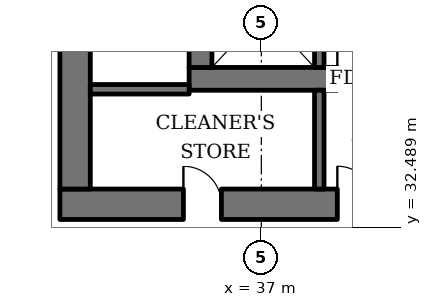
"""IFC4 building model, lengths in metres.
Left out: names, types, materials, properties, quantities, classifications, styles, units other than length and angle.
Written with IfcOpenShell. Run it as: python <this file> out.ifc"""

import sys

from ifc_helpers import new_model, si_unit, direction, frame, frame_2d, origin, place, context, subcontext, project, spatial, rectangle, extrude, element, fill, save


model = new_model("IFC4")
c1 = context("Model", 3, precision=1e-05, world=origin(), true_north=direction((0.0, 1.0)))
c2 = subcontext(c1, "Body", "Model", "MODEL_VIEW")
j1 = project(units=[si_unit("LENGTHUNIT", "METRE"), si_unit("PLANEANGLEUNIT", "RADIAN")], contexts=[c1])
p1 = place(None, origin())
s1 = spatial("IfcSite", under=j1, at=p1, CompositionType="ELEMENT")
p2 = place(p1, origin())
s2 = spatial("IfcBuilding", under=s1, at=p2, CompositionType="ELEMENT")
p3 = place(p2, frame((0.0, 0.0, -5.0)))
s3 = spatial("IfcBuildingStorey", under=s2, at=p3, CompositionType="ELEMENT", Elevation=-5.0)
p4 = place(p3, frame((35.1, 36.4, 0.0), z_axis=(0.0, 0.0, 1.0), x_axis=(1.0, 0.0, 0.0)))
e1 = element("IfcWall", 1, at=p4, inside=s3, PredefinedType="SHEAR", context=c2, shape_type="SweptSolid", body=[
    extrude(rectangle(XDim=19.8, YDim=0.6, at=frame_2d((9.9, 0.0))), origin(), (0.0, 0.0, 1.0), 5.0),
])
p5 = place(p4, frame((3.9, 0.0, 0.0)))
e2 = element("IfcOpeningElement", 2, at=p5, cuts=e1, PredefinedType="OPENING", context=c2, shape_type="SweptSolid", body=[
    extrude(rectangle(XDim=1.0, YDim=2.1, at=frame_2d((0.5, 1.05))), frame((0.0, 0.31, 0.0), z_axis=(0.0, -1.0, 0.0), x_axis=(1.0, 0.0, 0.0)), (0.0, 0.0, 1.0), 0.62),
])
p6 = place(p4, frame((15.35, 0.0, 0.0)))
e3 = element("IfcOpeningElement", 3, at=p6, cuts=e1, PredefinedType="OPENING", context=c2, shape_type="SweptSolid", body=[
    extrude(rectangle(XDim=1.0, YDim=2.1, at=frame_2d((0.5, 1.05))), frame((0.0, 0.31, 0.0), z_axis=(0.0, -1.0, 0.0), x_axis=(1.0, 0.0, 0.0)), (0.0, 0.0, 1.0), 0.62),
])
p7 = place(p3, frame((35.4, 36.7, 0.0), z_axis=(0.0, 0.0, 1.0), x_axis=(0.0, 1.0, 0.0)))
e4 = element("IfcWall", 4, at=p7, inside=s3, PredefinedType="SHEAR", context=c2, shape_type="SweptSolid", body=[
    extrude(rectangle(XDim=18.6, YDim=0.6, at=frame_2d((9.3, 0.0))), origin(), (0.0, 0.0, 1.0), 5.0),
])
p8 = place(p7, frame((8.4, 0.0, 0.0)))
e5 = element("IfcOpeningElement", 5, at=p8, cuts=e4, PredefinedType="OPENING", context=c2, shape_type="SweptSolid", body=[
    extrude(rectangle(XDim=1.8, YDim=2.4, at=frame_2d((0.9, 1.2))), frame((0.0, 0.31, 0.0), z_axis=(0.0, -1.0, 0.0), x_axis=(1.0, 0.0, 0.0)), (0.0, 0.0, 1.0), 0.62),
])
p9 = place(p3, frame((31.7, 33.1, 0.0), z_axis=(0.0, 0.0, 1.0), x_axis=(1.0, 0.0, 0.0)))
e6 = element("IfcWall", 6, at=p9, inside=s3, PredefinedType="SHEAR", context=c2, shape_type="SweptSolid", body=[
    extrude(rectangle(XDim=26.6, YDim=0.8, at=frame_2d((13.3, 0.0))), origin(), (0.0, 0.0, 1.0), 5.0),
])
p10 = place(p9, frame((7.3, 0.0, 0.0)))
e7 = element("IfcOpeningElement", 7, at=p10, cuts=e6, PredefinedType="OPENING", context=c2, shape_type="SweptSolid", body=[
    extrude(rectangle(XDim=1.0, YDim=2.1, at=frame_2d((0.5, 1.05))), frame((0.0, 0.41, 0.0), z_axis=(0.0, -1.0, 0.0), x_axis=(1.0, 0.0, 0.0)), (0.0, 0.0, 1.0), 0.82),
])
p11 = place(p9, frame((18.75, 0.0, 0.0)))
e8 = element("IfcOpeningElement", 8, at=p11, cuts=e6, PredefinedType="OPENING", context=c2, shape_type="SweptSolid", body=[
    extrude(rectangle(XDim=1.0, YDim=2.1, at=frame_2d((0.5, 1.05))), frame((0.0, 0.41, 0.0), z_axis=(0.0, -1.0, 0.0), x_axis=(1.0, 0.0, 0.0)), (0.0, 0.0, 1.0), 0.82),
])
p12 = place(p9, frame((3.25, 0.0, 0.0)))
e9 = element("IfcOpeningElement", 9, at=p12, cuts=e6, PredefinedType="OPENING", context=c2, shape_type="SweptSolid", body=[
    extrude(rectangle(XDim=1.0, YDim=2.1, at=frame_2d((0.5, 1.05))), frame((0.0, 0.41, 0.0), z_axis=(0.0, -1.0, 0.0), x_axis=(1.0, 0.0, 0.0)), (0.0, 0.0, 1.0), 0.82),
])
p13 = place(p9, frame((10.42, 0.0, 0.0)))
e10 = element("IfcOpeningElement", 10, at=p13, cuts=e6, PredefinedType="OPENING", context=c2, shape_type="SweptSolid", body=[
    extrude(rectangle(XDim=1.0, YDim=2.1, at=frame_2d((0.5, 1.05))), frame((0.0, 0.41, 0.0), z_axis=(0.0, -1.0, 0.0), x_axis=(1.0, 0.0, 0.0)), (0.0, 0.0, 1.0), 0.82),
])
p14 = place(p9, frame((14.46, 0.0, 0.0)))
e11 = element("IfcOpeningElement", 11, at=p14, cuts=e6, PredefinedType="OPENING", context=c2, shape_type="SweptSolid", body=[
    extrude(rectangle(XDim=1.0, YDim=2.1, at=frame_2d((0.5, 1.05))), frame((0.0, 0.41, 0.0), z_axis=(0.0, -1.0, 0.0), x_axis=(1.0, 0.0, 0.0)), (0.0, 0.0, 1.0), 0.82),
])
p15 = place(p9, frame((22.45, 0.0, 0.0)))
e12 = element("IfcOpeningElement", 12, at=p15, cuts=e6, PredefinedType="OPENING", context=c2, shape_type="SweptSolid", body=[
    extrude(rectangle(XDim=1.0, YDim=2.1, at=frame_2d((0.5, 1.05))), frame((0.0, 0.41, 0.0), z_axis=(0.0, -1.0, 0.0), x_axis=(1.0, 0.0, 0.0)), (0.0, 0.0, 1.0), 0.82),
])
p16 = place(p3, frame((32.1, 33.5, 0.0), z_axis=(0.0, 0.0, 1.0), x_axis=(0.0, 1.0, 0.0)))
e13 = element("IfcWall", 13, at=p16, inside=s3, PredefinedType="SHEAR", context=c2, shape_type="SweptSolid", body=[
    extrude(rectangle(XDim=25.0, YDim=0.8, at=frame_2d((12.5, 0.0))), origin(), (0.0, 0.0, 1.0), 5.0),
])
p17 = place(p16, frame((11.6, 0.0, 0.0)))
e14 = element("IfcOpeningElement", 14, at=p17, cuts=e13, PredefinedType="OPENING", context=c2, shape_type="SweptSolid", body=[
    extrude(rectangle(XDim=1.8, YDim=2.4, at=frame_2d((0.9, 1.2))), frame((0.0, 0.41, 0.0), z_axis=(0.0, -1.0, 0.0), x_axis=(1.0, 0.0, 0.0)), (0.0, 0.0, 1.0), 0.82),
])
p18 = place(p3, frame((38.525, 36.7, 0.0), z_axis=(0.0, 0.0, 1.0), x_axis=(0.0, 1.0, 0.0)))
e15 = element("IfcWall", 15, at=p18, inside=s3, PredefinedType="SHEAR", context=c2, shape_type="SweptSolid", body=[
    extrude(rectangle(XDim=2.9, YDim=0.25, at=frame_2d((1.45, 0.0))), origin(), (0.0, 0.0, 1.0), 5.0),
])
p19 = place(p18, frame((0.8, 0.0, 0.0)))
e16 = element("IfcOpeningElement", 16, at=p19, cuts=e15, PredefinedType="OPENING", context=c2, shape_type="SweptSolid", body=[
    extrude(rectangle(XDim=1.3, YDim=2.2, at=frame_2d((0.65, 1.1))), frame((0.0, 0.135, 0.0), z_axis=(0.0, -1.0, 0.0), x_axis=(1.0, 0.0, 0.0)), (0.0, 0.0, 1.0), 0.27),
])
p20 = place(p3, frame((32.5, 36.125, 0.0), z_axis=(0.0, 0.0, 1.0), x_axis=(1.0, 0.0, 0.0)))
e17 = element("IfcWall", 17, at=p20, inside=s3, PredefinedType="SHEAR", context=c2, shape_type="SweptSolid", body=[
    extrude(rectangle(XDim=2.6, YDim=0.25, at=frame_2d((1.3, 0.0))), origin(), (0.0, 0.0, 1.0), 5.0),
])
p21 = place(p3, frame((38.525, 33.5, 0.0), z_axis=(0.0, 0.0, 1.0), x_axis=(0.0, 1.0, 0.0)))
e18 = element("IfcWall", 18, at=p21, inside=s3, PredefinedType="SOLIDWALL", context=c2, shape_type="SweptSolid", body=[
    extrude(rectangle(XDim=2.6, YDim=0.25, at=frame_2d((1.3, 0.0))), origin(), (0.0, 0.0, 1.0), 4.7),
])
p22 = place(p5, origin())
e19 = element("IfcDoor", 19, at=p22, inside=s3, OperationType="SINGLE_SWING_LEFT", PredefinedType="DOOR", context=c2, shape_type="SweptSolid", body=[
    extrude(rectangle(XDim=1.0, YDim=2.1, at=frame_2d((0.5, 1.05))), frame((0.0, 0.025, 0.0), z_axis=(0.0, -1.0, 0.0), x_axis=(1.0, 0.0, 0.0)), (0.0, 0.0, 1.0), 0.05),
])
fill(e2, e19)
p23 = place(p10, origin())
e20 = element("IfcDoor", 20, at=p23, inside=s3, OperationType="SINGLE_SWING_LEFT", PredefinedType="DOOR", context=c2, shape_type="SweptSolid", body=[
    extrude(rectangle(XDim=1.0, YDim=2.1, at=frame_2d((0.5, 1.05))), frame((0.0, 0.025, 0.0), z_axis=(0.0, -1.0, 0.0), x_axis=(1.0, 0.0, 0.0)), (0.0, 0.0, 1.0), 0.05),
])
fill(e7, e20)
p24 = place(p12, origin())
e21 = element("IfcDoor", 21, at=p24, inside=s3, OperationType="SINGLE_SWING_LEFT", PredefinedType="DOOR", context=c2, shape_type="SweptSolid", body=[
    extrude(rectangle(XDim=1.0, YDim=2.1, at=frame_2d((0.5, 1.05))), frame((0.0, 0.39, 0.0), z_axis=(0.0, -1.0, 0.0), x_axis=(1.0, 0.0, 0.0)), (0.0, 0.0, 1.0), 0.05),
])
fill(e9, e21)
save(model, sys.argv[1])
